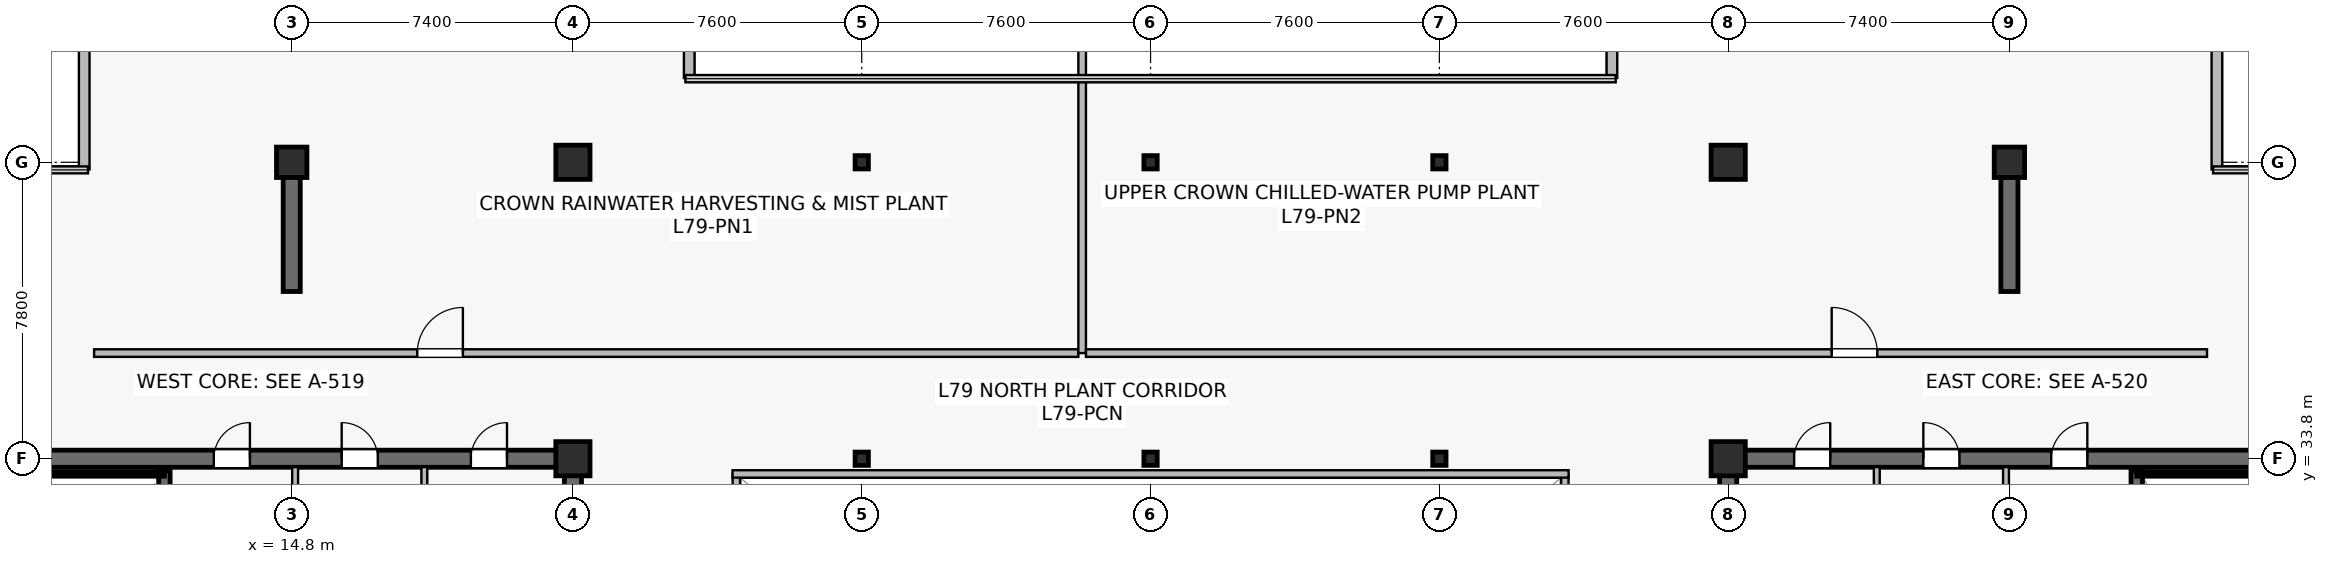
"""IFC4 building model, lengths in metres.
Left out: names, types, materials, properties, quantities, classifications, styles, units other than length and angle.
Written with IfcOpenShell. Run it as: python <this file> out.ifc"""

import sys

from ifc_helpers import new_model, si_unit, direction, frame, frame_2d, origin, origin_2d, place, context, subcontext, project, spatial, rectangle, i_section, extrude, source, transform, mapped, element, fill, save


model = new_model("IFC4")
c1 = context("Model", 3, precision=1e-05, world=origin(), true_north=direction((0.0, 1.0)))
c2 = subcontext(c1, "Body", "Model", "MODEL_VIEW")
j1 = project(units=[si_unit("LENGTHUNIT", "METRE"), si_unit("PLANEANGLEUNIT", "RADIAN")], contexts=[c1])
p1 = place(None, origin())
s1 = spatial("IfcSite", under=j1, at=p1, CompositionType="ELEMENT")
p2 = place(p1, origin())
s2 = spatial("IfcBuilding", under=s1, at=p2, CompositionType="ELEMENT")
p3 = place(p2, frame((0.0, 0.0, 332.4)))
s3 = spatial("IfcBuildingStorey", under=s2, at=p3, CompositionType="ELEMENT", Elevation=332.4)
p4 = place(p3, frame((7.175, 33.8, 0.0), z_axis=(0.0, 0.0, 1.0), x_axis=(1.0, 0.0, 0.0)))
e1 = element("IfcWall", 1, at=p4, inside=s3, PredefinedType="SHEAR", context=c2, shape_type="SweptSolid", body=[
    extrude(rectangle(XDim=15.25, YDim=0.45, at=frame_2d((7.625, 0.0))), origin(), (0.0, 0.0, 1.0), 5.12),
])
p5 = place(p4, frame((5.575, 0.0, 0.0)))
e2 = element("IfcOpeningElement", 2, at=p5, cuts=e1, PredefinedType="OPENING", context=c2, shape_type="SweptSolid", body=[
    extrude(rectangle(XDim=0.95, YDim=2.15, at=frame_2d((0.475, 1.075))), frame((0.0, 0.235, 0.0), z_axis=(0.0, -1.0, 0.0), x_axis=(1.0, 0.0, 0.0)), (0.0, 0.0, 1.0), 0.47),
])
p6 = place(p4, frame((8.94, 0.0, 0.0)))
e3 = element("IfcOpeningElement", 3, at=p6, cuts=e1, PredefinedType="OPENING", context=c2, shape_type="SweptSolid", body=[
    extrude(rectangle(XDim=0.95, YDim=2.15, at=frame_2d((0.475, 1.075))), frame((0.0, 0.235, 0.0), z_axis=(0.0, -1.0, 0.0), x_axis=(1.0, 0.0, 0.0)), (0.0, 0.0, 1.0), 0.47),
])
p7 = place(p4, frame((12.34, 0.0, 0.0)))
e4 = element("IfcOpeningElement", 4, at=p7, cuts=e1, PredefinedType="OPENING", context=c2, shape_type="SweptSolid", body=[
    extrude(rectangle(XDim=0.95, YDim=2.15, at=frame_2d((0.475, 1.075))), frame((0.0, 0.235, 0.0), z_axis=(0.0, -1.0, 0.0), x_axis=(1.0, 0.0, 0.0)), (0.0, 0.0, 1.0), 0.47),
])
p8 = place(p3, frame((22.2, 15.025, 0.0), z_axis=(0.0, 0.0, 1.0), x_axis=(0.0, 1.0, 0.0)))
e5 = element("IfcWall", 5, at=p8, inside=s3, PredefinedType="SHEAR", context=c2, shape_type="SweptSolid", body=[
    extrude(rectangle(XDim=18.55, YDim=0.45, at=frame_2d((9.275, 0.0))), origin(), (0.0, 0.0, 1.0), 5.12),
])
p9 = place(p8, frame((3.525, 0.0, 0.0)))
e6 = element("IfcOpeningElement", 6, at=p9, cuts=e5, PredefinedType="OPENING", context=c2, shape_type="SweptSolid", body=[
    extrude(rectangle(XDim=1.42, YDim=2.2, at=frame_2d((0.71, 1.1))), frame((0.0, 0.235, 0.0), z_axis=(0.0, -1.0, 0.0), x_axis=(1.0, 0.0, 0.0)), (0.0, 0.0, 1.0), 0.47),
])
p10 = place(p3, frame((11.45, 24.85, 0.0), z_axis=(0.0, 0.0, 1.0), x_axis=(0.0, 1.0, 0.0)))
e7 = element("IfcWall", 7, at=p10, inside=s3, PredefinedType="SHEAR", context=c2, shape_type="SweptSolid", body=[
    extrude(rectangle(XDim=8.63, YDim=0.3, at=frame_2d((4.315, 0.0))), origin(), (0.0, 0.0, 1.0), 5.12),
])
p11 = place(p10, frame((0.42, 0.0, 0.0)))
e8 = element("IfcOpeningElement", 8, at=p11, cuts=e7, PredefinedType="OPENING", context=c2, shape_type="SweptSolid", body=[
    extrude(rectangle(XDim=1.1, YDim=2.15, at=frame_2d((0.55, 1.075))), frame((0.0, 0.16, 0.0), z_axis=(0.0, -1.0, 0.0), x_axis=(1.0, 0.0, 0.0)), (0.0, 0.0, 1.0), 0.32),
])
p12 = place(p3, frame((7.73, 33.4, 0.0), z_axis=(0.0, 0.0, 1.0), x_axis=(1.0, 0.0, 0.0)))
e9 = element("IfcWall", 9, at=p12, inside=s3, PredefinedType="SOLIDWALL", context=c2, shape_type="SweptSolid", body=[
    extrude(rectangle(XDim=3.72, YDim=0.12, at=frame_2d((1.86, 0.0))), origin(), (0.0, 0.0, 1.0), 5.12),
])
p13 = place(p3, frame((52.375, 33.8, 0.0), z_axis=(0.0, 0.0, 1.0), x_axis=(1.0, 0.0, 0.0)))
e10 = element("IfcWall", 10, at=p13, inside=s3, PredefinedType="SHEAR", context=c2, shape_type="SweptSolid", body=[
    extrude(rectangle(XDim=15.25, YDim=0.45, at=frame_2d((7.625, 0.0))), origin(), (0.0, 0.0, 1.0), 5.12),
])
p14 = place(p13, frame((8.725, 0.0, 0.0)))
e11 = element("IfcOpeningElement", 11, at=p14, cuts=e10, PredefinedType="OPENING", context=c2, shape_type="SweptSolid", body=[
    extrude(rectangle(XDim=0.95, YDim=2.15, at=frame_2d((0.475, 1.075))), frame((0.0, 0.235, 0.0), z_axis=(0.0, -1.0, 0.0), x_axis=(1.0, 0.0, 0.0)), (0.0, 0.0, 1.0), 0.47),
])
p15 = place(p13, frame((5.36, 0.0, 0.0)))
e12 = element("IfcOpeningElement", 12, at=p15, cuts=e10, PredefinedType="OPENING", context=c2, shape_type="SweptSolid", body=[
    extrude(rectangle(XDim=0.95, YDim=2.15, at=frame_2d((0.475, 1.075))), frame((0.0, 0.235, 0.0), z_axis=(0.0, -1.0, 0.0), x_axis=(1.0, 0.0, 0.0)), (0.0, 0.0, 1.0), 0.47),
])
p16 = place(p13, frame((1.96, 0.0, 0.0)))
e13 = element("IfcOpeningElement", 13, at=p16, cuts=e10, PredefinedType="OPENING", context=c2, shape_type="SweptSolid", body=[
    extrude(rectangle(XDim=0.95, YDim=2.15, at=frame_2d((0.475, 1.075))), frame((0.0, 0.235, 0.0), z_axis=(0.0, -1.0, 0.0), x_axis=(1.0, 0.0, 0.0)), (0.0, 0.0, 1.0), 0.47),
])
p17 = place(p3, frame((52.6, 15.025, 0.0), z_axis=(0.0, 0.0, 1.0), x_axis=(0.0, 1.0, 0.0)))
e14 = element("IfcWall", 14, at=p17, inside=s3, PredefinedType="SHEAR", context=c2, shape_type="SweptSolid", body=[
    extrude(rectangle(XDim=18.55, YDim=0.45, at=frame_2d((9.275, 0.0))), origin(), (0.0, 0.0, 1.0), 5.12),
])
p18 = place(p17, frame((3.525, 0.0, 0.0)))
e15 = element("IfcOpeningElement", 15, at=p18, cuts=e14, PredefinedType="OPENING", context=c2, shape_type="SweptSolid", body=[
    extrude(rectangle(XDim=1.42, YDim=2.2, at=frame_2d((0.71, 1.1))), frame((0.0, 0.235, 0.0), z_axis=(0.0, -1.0, 0.0), x_axis=(1.0, 0.0, 0.0)), (0.0, 0.0, 1.0), 0.47),
])
p19 = place(p3, frame((63.35, 24.85, 0.0), z_axis=(0.0, 0.0, 1.0), x_axis=(0.0, 1.0, 0.0)))
e16 = element("IfcWall", 16, at=p19, inside=s3, PredefinedType="SHEAR", context=c2, shape_type="SweptSolid", body=[
    extrude(rectangle(XDim=8.63, YDim=0.3, at=frame_2d((4.315, 0.0))), origin(), (0.0, 0.0, 1.0), 5.12),
])
p20 = place(p19, frame((0.42, 0.0, 0.0)))
e17 = element("IfcOpeningElement", 17, at=p20, cuts=e16, PredefinedType="OPENING", context=c2, shape_type="SweptSolid", body=[
    extrude(rectangle(XDim=1.1, YDim=2.15, at=frame_2d((0.55, 1.075))), frame((0.0, 0.16, 0.0), z_axis=(0.0, -1.0, 0.0), x_axis=(1.0, 0.0, 0.0)), (0.0, 0.0, 1.0), 0.32),
])
p21 = place(p3, frame((63.35, 33.4, 0.0), z_axis=(0.0, 0.0, 1.0), x_axis=(1.0, 0.0, 0.0)))
e18 = element("IfcWall", 18, at=p21, inside=s3, PredefinedType="SOLIDWALL", context=c2, shape_type="SweptSolid", body=[
    extrude(rectangle(XDim=3.72, YDim=0.12, at=frame_2d((1.86, 0.0))), origin(), (0.0, 0.0, 1.0), 5.12),
])
for number, where, z_axis, x_axis in (
    (19, (14.8, 38.2, 0.0), (0.0, 0.0, 1.0), (0.0, 1.0, 0.0)),
    (20, (60.0, 38.2, 0.0), (0.0, 0.0, 1.0), (0.0, 1.0, 0.0)),
):
    element("IfcWall", number, at=place(p3, frame(where, z_axis=z_axis, x_axis=x_axis)), inside=s3, PredefinedType="SHEAR", context=c2, shape_type="SweptSolid", body=[
        extrude(rectangle(XDim=3.1, YDim=0.45, at=frame_2d((1.55, 0.0))), origin(), (0.0, 0.0, 1.0), 5.12),
    ])
m1 = source(origin(), c2, "Body", "SweptSolid", [
    extrude(rectangle(XDim=0.9, YDim=0.9, at=origin_2d()), origin(), (0.0, 0.0, 1.0), 5.4),
])
p22 = place(p3, frame((22.2, 33.8, 0.0), z_axis=(0.0, 0.0, 1.0), x_axis=(1.0, 0.0, 0.0)))
e21 = element("IfcColumn", 21, at=p22, inside=s3, PredefinedType="COLUMN", context=c2, shape_type="MappedRepresentation", body=[
    mapped(m1, transform((0.0, 0.0, 0.0), scale=1.0)),
])
m2 = source(origin(), c2, "Body", "SweptSolid", [
    extrude(rectangle(XDim=0.8, YDim=0.8, at=origin_2d()), origin(), (0.0, 0.0, 1.0), 5.4),
])
p23 = place(p3, frame((14.8, 41.6, 0.0), z_axis=(0.0, 0.0, 1.0), x_axis=(1.0, 0.0, 0.0)))
e22 = element("IfcColumn", 22, at=p23, inside=s3, PredefinedType="COLUMN", context=c2, shape_type="MappedRepresentation", body=[
    mapped(m2, transform((0.0, 0.0, 0.0), scale=1.0)),
])
for number, where, z_axis, x_axis in (
    (23, (22.2, 41.6, 0.0), (0.0, 0.0, 1.0), (1.0, 0.0, 0.0)),
    (24, (52.6, 33.8, 0.0), (0.0, 0.0, 1.0), (1.0, 0.0, 0.0)),
    (25, (52.6, 41.6, 0.0), (0.0, 0.0, 1.0), (1.0, 0.0, 0.0)),
):
    element("IfcColumn", number, at=place(p3, frame(where, z_axis=z_axis, x_axis=x_axis)), inside=s3, PredefinedType="COLUMN", context=c2, shape_type="MappedRepresentation", body=[
        mapped(m1, transform((0.0, 0.0, 0.0), scale=1.0)),
    ])
p24 = place(p3, frame((60.0, 41.6, 0.0), z_axis=(0.0, 0.0, 1.0), x_axis=(1.0, 0.0, 0.0)))
e26 = element("IfcColumn", 26, at=p24, inside=s3, PredefinedType="COLUMN", context=c2, shape_type="MappedRepresentation", body=[
    mapped(m2, transform((0.0, 0.0, 0.0), scale=1.0)),
])
m3 = source(origin(), c2, "Body", "SweptSolid", [
    extrude(i_section(OverallWidth=0.35, OverallDepth=0.35, WebThickness=0.012, FlangeThickness=0.019, at=origin_2d()), origin(), (0.0, 0.0, 1.0), 5.4),
])
for number, where, z_axis, x_axis in (
    (27, (29.8, 33.8, 0.0), (0.0, 0.0, 1.0), (1.0, 0.0, 0.0)),
    (28, (29.8, 41.6, 0.0), (0.0, 0.0, 1.0), (1.0, 0.0, 0.0)),
    (29, (37.4, 33.8, 0.0), (0.0, 0.0, 1.0), (1.0, 0.0, 0.0)),
    (30, (37.4, 41.6, 0.0), (0.0, 0.0, 1.0), (1.0, 0.0, 0.0)),
    (31, (45.0, 33.8, 0.0), (0.0, 0.0, 1.0), (1.0, 0.0, 0.0)),
    (32, (45.0, 41.6, 0.0), (0.0, 0.0, 1.0), (1.0, 0.0, 0.0)),
):
    element("IfcColumn", number, at=place(p3, frame(where, z_axis=z_axis, x_axis=x_axis)), inside=s3, PredefinedType="COLUMN", context=c2, shape_type="MappedRepresentation", body=[
        mapped(m3, transform((0.0, 0.0, 0.0), scale=1.0)),
    ])
p25 = place(p3, frame((65.46, 41.412, 0.0), z_axis=(0.0, 0.0, 1.0), x_axis=(0.0, 1.0, 0.0)))
e33 = element("IfcWall", 33, at=p25, inside=s3, PredefinedType="STANDARD", context=c2, shape_type="SweptSolid", body=[
    extrude(rectangle(XDim=3.488, YDim=0.28, at=frame_2d((1.744, 0.0))), origin(), (0.0, 0.0, 1.0), 5.12),
])
for number, where, z_axis, x_axis in (
    (34, (49.54, 44.9, 0.0), (0.0, 0.0, 1.0), (0.0, -1.0, 0.0)),
    (35, (25.26, 43.817, 0.0), (0.0, 0.0, 1.0), (0.0, 1.0, 0.0)),
):
    element("IfcWall", number, at=place(p3, frame(where, z_axis=z_axis, x_axis=x_axis)), inside=s3, PredefinedType="STANDARD", context=c2, shape_type="SweptSolid", body=[
        extrude(rectangle(XDim=1.083, YDim=0.28, at=frame_2d((0.542, 0.0))), origin(), (0.0, 0.0, 1.0), 5.12),
    ])
p26 = place(p3, frame((9.34, 44.9, 0.0), z_axis=(0.0, 0.0, 1.0), x_axis=(0.0, -1.0, 0.0)))
e36 = element("IfcWall", 36, at=p26, inside=s3, PredefinedType="STANDARD", context=c2, shape_type="SweptSolid", body=[
    extrude(rectangle(XDim=3.488, YDim=0.28, at=frame_2d((1.744, 0.0))), origin(), (0.0, 0.0, 1.0), 5.12),
])
p27 = place(p3, frame((14.89, 29.65, 0.0), z_axis=(0.0, 0.0, 1.0), x_axis=(0.0, 1.0, 0.0)))
e37 = element("IfcWall", 37, at=p27, inside=s3, PredefinedType="PLUMBINGWALL", context=c2, shape_type="SweptSolid", body=[
    extrude(rectangle(XDim=3.93, YDim=0.155, at=frame_2d((1.965, 0.0))), origin(), (0.0, 0.0, 1.0), 4.355),
])
p28 = place(p3, frame((18.29, 29.65, 0.0), z_axis=(0.0, 0.0, 1.0), x_axis=(0.0, 1.0, 0.0)))
e38 = element("IfcWall", 38, at=p28, inside=s3, PredefinedType="PLUMBINGWALL", context=c2, shape_type="SweptSolid", body=[
    extrude(rectangle(XDim=3.93, YDim=0.155, at=frame_2d((1.965, 0.0))), origin(), (0.0, 0.0, 1.0), 5.12),
])
p29 = place(p3, frame((59.91, 29.65, 0.0), z_axis=(0.0, 0.0, 1.0), x_axis=(0.0, 1.0, 0.0)))
e39 = element("IfcWall", 39, at=p29, inside=s3, PredefinedType="PLUMBINGWALL", context=c2, shape_type="SweptSolid", body=[
    extrude(rectangle(XDim=3.93, YDim=0.155, at=frame_2d((1.965, 0.0))), origin(), (0.0, 0.0, 1.0), 4.355),
])
p30 = place(p3, frame((56.51, 29.65, 0.0), z_axis=(0.0, 0.0, 1.0), x_axis=(0.0, 1.0, 0.0)))
e40 = element("IfcWall", 40, at=p30, inside=s3, PredefinedType="PLUMBINGWALL", context=c2, shape_type="SweptSolid", body=[
    extrude(rectangle(XDim=3.93, YDim=0.155, at=frame_2d((1.965, 0.0))), origin(), (0.0, 0.0, 1.0), 5.12),
])
p31 = place(p3, frame((26.5, 15.2, 0.0), z_axis=(0.0, 0.0, 1.0), x_axis=(0.0, 1.0, 0.0)))
e41 = element("IfcWall", 41, at=p31, inside=s3, PredefinedType="SOLIDWALL", context=c2, shape_type="SweptSolid", body=[
    extrude(rectangle(XDim=18.2, YDim=0.195, at=frame_2d((9.1, 0.0))), origin(), (0.0, 0.0, 1.0), 5.12),
])
p32 = place(p31, frame((1.8, 0.0, 0.9)))
e42 = element("IfcOpeningElement", 42, at=p32, cuts=e41, PredefinedType="OPENING", context=c2, shape_type="SweptSolid", body=[
    extrude(rectangle(XDim=1.2, YDim=1.35, at=frame_2d((0.6, 0.675))), frame((0.0, 0.107, 0.0), z_axis=(0.0, -1.0, 0.0), x_axis=(1.0, 0.0, 0.0)), (0.0, 0.0, 1.0), 0.215),
])
p33 = place(p31, frame((13.2, 0.0, 0.9)))
e43 = element("IfcOpeningElement", 43, at=p33, cuts=e41, PredefinedType="OPENING", context=c2, shape_type="SweptSolid", body=[
    extrude(rectangle(XDim=1.2, YDim=1.35, at=frame_2d((0.6, 0.675))), frame((0.0, 0.107, 0.0), z_axis=(0.0, -1.0, 0.0), x_axis=(1.0, 0.0, 0.0)), (0.0, 0.0, 1.0), 0.215),
])
p34 = place(p3, frame((48.3, 15.2, 0.0), z_axis=(0.0, 0.0, 1.0), x_axis=(0.0, 1.0, 0.0)))
e44 = element("IfcWall", 44, at=p34, inside=s3, PredefinedType="SOLIDWALL", context=c2, shape_type="SweptSolid", body=[
    extrude(rectangle(XDim=18.2, YDim=0.195, at=frame_2d((9.1, 0.0))), origin(), (0.0, 0.0, 1.0), 5.12),
])
p35 = place(p34, frame((1.8, 0.0, 0.9)))
e45 = element("IfcOpeningElement", 45, at=p35, cuts=e44, PredefinedType="OPENING", context=c2, shape_type="SweptSolid", body=[
    extrude(rectangle(XDim=1.2, YDim=1.35, at=frame_2d((0.6, 0.675))), frame((0.0, 0.107, 0.0), z_axis=(0.0, -1.0, 0.0), x_axis=(1.0, 0.0, 0.0)), (0.0, 0.0, 1.0), 0.215),
])
p36 = place(p34, frame((13.2, 0.0, 0.9)))
e46 = element("IfcOpeningElement", 46, at=p36, cuts=e44, PredefinedType="OPENING", context=c2, shape_type="SweptSolid", body=[
    extrude(rectangle(XDim=1.2, YDim=1.35, at=frame_2d((0.6, 0.675))), frame((0.0, 0.107, 0.0), z_axis=(0.0, -1.0, 0.0), x_axis=(1.0, 0.0, 0.0)), (0.0, 0.0, 1.0), 0.215),
])
p37 = place(p3, frame((26.4, 33.4, 0.0), z_axis=(0.0, 0.0, 1.0), x_axis=(1.0, 0.0, 0.0)))
e47 = element("IfcWall", 47, at=p37, inside=s3, PredefinedType="SOLIDWALL", context=c2, shape_type="SweptSolid", body=[
    extrude(rectangle(XDim=22.0, YDim=0.195, at=frame_2d((11.0, 0.0))), origin(), (0.0, 0.0, 1.0), 5.12),
])
p38 = place(p3, frame((9.6, 36.58, 0.0), z_axis=(0.0, 0.0, 1.0), x_axis=(1.0, 0.0, 0.0)))
e48 = element("IfcWall", 48, at=p38, inside=s3, PredefinedType="SOLIDWALL", context=c2, shape_type="SweptSolid", body=[
    extrude(rectangle(XDim=25.9, YDim=0.2, at=frame_2d((12.95, 0.0))), origin(), (0.0, 0.0, 1.0), 4.355),
])
p39 = place(p38, frame((8.504, 0.0, 0.0)))
e49 = element("IfcOpeningElement", 49, at=p39, cuts=e48, PredefinedType="OPENING", context=c2, shape_type="SweptSolid", body=[
    extrude(rectangle(XDim=1.2, YDim=2.16, at=frame_2d((0.6, 1.08))), frame((0.0, 0.11, 0.0), z_axis=(0.0, -1.0, 0.0), x_axis=(1.0, 0.0, 0.0)), (0.0, 0.0, 1.0), 0.22),
])
p40 = place(p3, frame((35.6, 36.58, 0.0), z_axis=(0.0, 0.0, 1.0), x_axis=(0.0, 1.0, 0.0)))
e50 = element("IfcWall", 50, at=p40, inside=s3, PredefinedType="SOLIDWALL", context=c2, shape_type="SweptSolid", body=[
    extrude(rectangle(XDim=8.21, YDim=0.2, at=frame_2d((4.105, 0.0))), origin(), (0.0, 0.0, 1.0), 4.455),
])
p41 = place(p3, frame((35.7, 36.58, 0.0), z_axis=(0.0, 0.0, 1.0), x_axis=(1.0, 0.0, 0.0)))
e51 = element("IfcWall", 51, at=p41, inside=s3, PredefinedType="SOLIDWALL", context=c2, shape_type="SweptSolid", body=[
    extrude(rectangle(XDim=29.5, YDim=0.2, at=frame_2d((14.75, 0.0))), origin(), (0.0, 0.0, 1.0), 4.355),
])
p42 = place(p41, frame((19.623, 0.0, 0.0)))
e52 = element("IfcOpeningElement", 52, at=p42, cuts=e51, PredefinedType="OPENING", context=c2, shape_type="SweptSolid", body=[
    extrude(rectangle(XDim=1.2, YDim=2.16, at=frame_2d((0.6, 1.08))), frame((0.0, 0.11, 0.0), z_axis=(0.0, -1.0, 0.0), x_axis=(1.0, 0.0, 0.0)), (0.0, 0.0, 1.0), 0.22),
])
m4 = source(origin(), c2, "Body", "SweptSolid", [
    extrude(rectangle(XDim=0.95, YDim=2.15, at=frame_2d((0.475, 1.075))), frame((0.0, 0.025, 0.0), z_axis=(0.0, -1.0, 0.0), x_axis=(1.0, 0.0, 0.0)), (0.0, 0.0, 1.0), 0.05),
])
p43 = place(p5, origin())
e53 = element("IfcDoor", 53, at=p43, inside=s3, OperationType="SINGLE_SWING_RIGHT", PredefinedType="DOOR", context=c2, shape_type="MappedRepresentation", body=[
    mapped(m4, transform((0.0, 0.0, 0.0), scale=1.0)),
])
fill(e2, e53)
p44 = place(p6, origin())
e54 = element("IfcDoor", 54, at=p44, inside=s3, OperationType="SINGLE_SWING_LEFT", PredefinedType="DOOR", context=c2, shape_type="MappedRepresentation", body=[
    mapped(m4, transform((0.0, 0.0, 0.0), scale=1.0)),
])
fill(e3, e54)
p45 = place(p7, origin())
e55 = element("IfcDoor", 55, at=p45, inside=s3, OperationType="SINGLE_SWING_RIGHT", PredefinedType="DOOR", context=c2, shape_type="MappedRepresentation", body=[
    mapped(m4, transform((0.0, 0.0, 0.0), scale=1.0)),
])
fill(e4, e55)
p46 = place(p14, origin())
e56 = element("IfcDoor", 56, at=p46, inside=s3, OperationType="SINGLE_SWING_RIGHT", PredefinedType="DOOR", context=c2, shape_type="MappedRepresentation", body=[
    mapped(m4, transform((0.0, 0.0, 0.0), scale=1.0)),
])
fill(e11, e56)
p47 = place(p15, origin())
e57 = element("IfcDoor", 57, at=p47, inside=s3, OperationType="SINGLE_SWING_LEFT", PredefinedType="DOOR", context=c2, shape_type="MappedRepresentation", body=[
    mapped(m4, transform((0.0, 0.0, 0.0), scale=1.0)),
])
fill(e12, e57)
p48 = place(p16, origin())
e58 = element("IfcDoor", 58, at=p48, inside=s3, OperationType="SINGLE_SWING_RIGHT", PredefinedType="DOOR", context=c2, shape_type="MappedRepresentation", body=[
    mapped(m4, transform((0.0, 0.0, 0.0), scale=1.0)),
])
fill(e13, e58)
m5 = source(origin(), c2, "Body", "SweptSolid", [
    extrude(rectangle(XDim=1.2, YDim=2.16, at=frame_2d((0.6, 1.08))), frame((0.0, 0.025, 0.0), z_axis=(0.0, -1.0, 0.0), x_axis=(1.0, 0.0, 0.0)), (0.0, 0.0, 1.0), 0.05),
])
p49 = place(p39, origin())
e59 = element("IfcDoor", 59, at=p49, inside=s3, OperationType="SINGLE_SWING_RIGHT", PredefinedType="DOOR", context=c2, shape_type="MappedRepresentation", body=[
    mapped(m5, transform((0.0, 0.0, 0.0), scale=1.0)),
])
fill(e49, e59)
p50 = place(p42, origin())
e60 = element("IfcDoor", 60, at=p50, inside=s3, OperationType="SINGLE_SWING_LEFT", PredefinedType="DOOR", context=c2, shape_type="MappedRepresentation", body=[
    mapped(m5, transform((0.0, 0.0, 0.0), scale=1.0)),
])
fill(e52, e60)
save(model, sys.argv[1])
